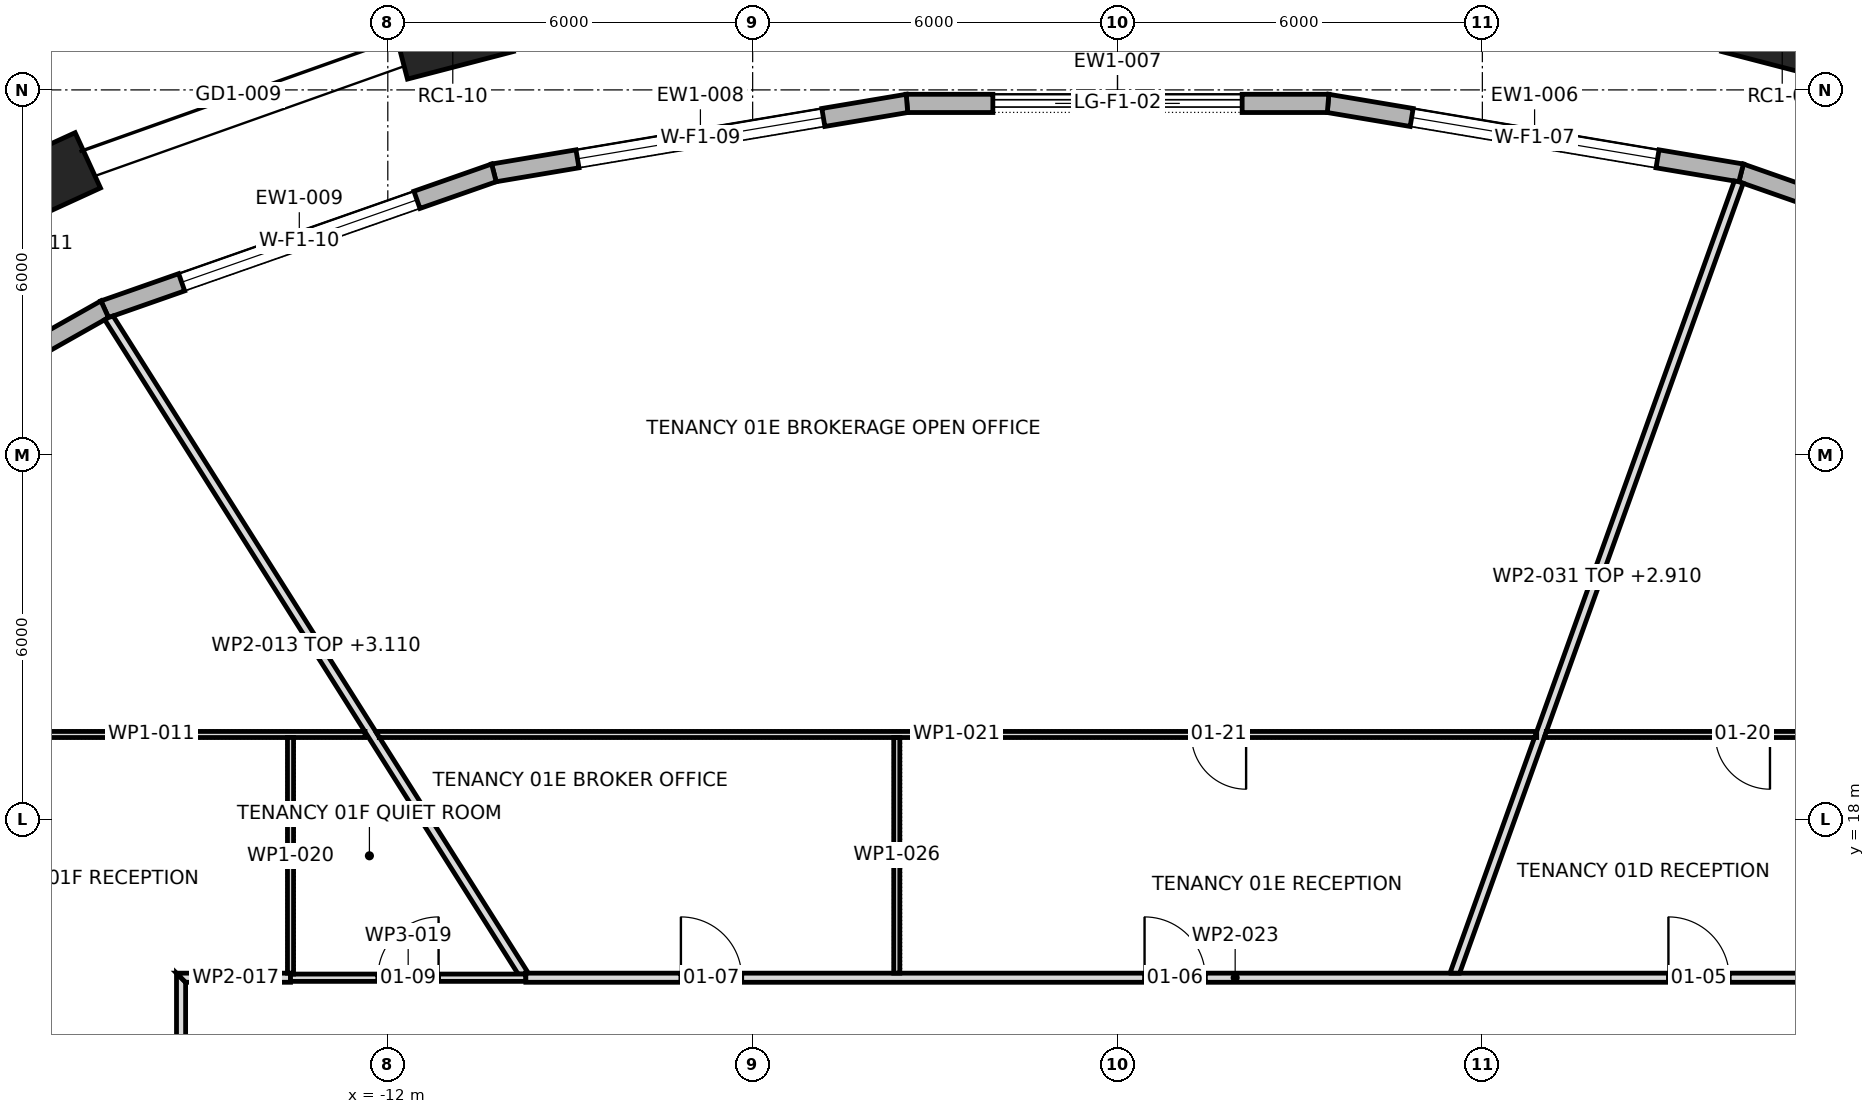
"""IFC4 building model, lengths in metres.
Left out: names, types, materials, properties, quantities, classifications, styles, units other than length and angle.
Written with IfcOpenShell. Run it as: python <this file> out.ifc"""

import sys

from ifc_helpers import new_model, si_unit, direction, frame, frame_2d, origin, origin_2d, place, context, subcontext, project, spatial, polyline, rectangle, outline, extrude, element, fill, save


model = new_model("IFC4")
c1 = context("Model", 3, precision=1e-05, world=origin(), true_north=direction((0.0, 1.0)))
c2 = subcontext(c1, "Body", "Model", "MODEL_VIEW")
j1 = project(units=[si_unit("LENGTHUNIT", "METRE"), si_unit("PLANEANGLEUNIT", "RADIAN")], contexts=[c1])
p1 = place(None, origin())
s1 = spatial("IfcSite", under=j1, at=p1, CompositionType="ELEMENT")
p2 = place(p1, origin())
s2 = spatial("IfcBuilding", under=s1, at=p2, CompositionType="ELEMENT")
p3 = place(p2, frame((0.0, 0.0, 31.9)))
s3 = spatial("IfcBuildingStorey", under=s2, at=p3, CompositionType="ELEMENT", Elevation=31.9)
for number, where, z_axis, x_axis in (
    (1, (10.931, 30.888, 0.0), (0.0, 0.0, 1.0), (-0.968, 0.252, 0.0)),
    (2, (-10.931, 30.888, 0.0), (0.0, 0.0, 1.0), (-0.968, -0.252, 0.0)),
    (3, (-17.752, 28.467, 0.0), (0.0, 0.0, 1.0), (-0.909, -0.417, 0.0)),
):
    element("IfcColumn", number, at=place(p3, frame(where, z_axis=z_axis, x_axis=x_axis)), inside=s3, PredefinedType="COLUMN", context=c2, shape_type="SweptSolid", body=[
        extrude(rectangle(XDim=1.8, YDim=1.0, at=origin_2d()), origin(), (0.0, 0.0, 1.0), 4.2),
    ])
p4 = place(p3, frame((16.656, 26.393, 0.0), z_axis=(0.0, 0.0, 1.0), x_axis=(-0.943767392455, 0.330610206947, 0.0)))
e4 = element("IfcWall", 4, at=p4, inside=s3, PredefinedType="STANDARD", context=c2, shape_type="SweptSolid", body=[
    extrude(outline(polyline([(-0.013, -0.15), (6.794, -0.15), (6.769, 0.15), (0.013, 0.15), (-0.013, -0.15)])), origin(), (0.0, 0.0, 1.0), 3.9),
])
p5 = place(p4, frame((1.341, 0.0, 0.6)))
e5 = element("IfcOpeningElement", 5, at=p5, cuts=e4, PredefinedType="OPENING", context=c2, shape_type="SweptSolid", body=[
    extrude(rectangle(XDim=4.1, YDim=2.85, at=frame_2d((2.05, 1.425))), frame((0.0, 0.162, 0.0), z_axis=(0.0, -1.0, 0.0), x_axis=(1.0, 0.0, 0.0)), (0.0, 0.0, 1.0), 0.324),
])
p6 = place(p3, frame((10.256, 28.635, 0.0), z_axis=(0.0, 0.0, 1.0), x_axis=(-0.986141805867, 0.165904607291, 0.0)))
e6 = element("IfcWall", 6, at=p6, inside=s3, PredefinedType="STANDARD", context=c2, shape_type="SweptSolid", body=[
    extrude(outline(polyline([(-0.013, -0.15), (6.901, -0.15), (6.876, 0.15), (0.013, 0.15), (-0.013, -0.15)])), origin(), (0.0, 0.0, 1.0), 3.9),
])
p7 = place(p6, frame((1.394, 0.0, 0.6)))
e7 = element("IfcOpeningElement", 7, at=p7, cuts=e6, PredefinedType="OPENING", context=c2, shape_type="SweptSolid", body=[
    extrude(rectangle(XDim=4.1, YDim=2.85, at=frame_2d((2.05, 1.425))), frame((0.0, 0.162, 0.0), z_axis=(0.0, -1.0, 0.0), x_axis=(1.0, 0.0, 0.0)), (0.0, 0.0, 1.0), 0.324),
])
p8 = place(p3, frame((3.463, 29.778, 0.0), z_axis=(0.0, 0.0, 1.0), x_axis=(-1.0, 0.0, 0.0)))
e8 = element("IfcWall", 8, at=p8, inside=s3, PredefinedType="STANDARD", context=c2, shape_type="SweptSolid", body=[
    extrude(outline(polyline([(-0.012, -0.15), (6.938, -0.15), (6.913, 0.15), (0.012, 0.15), (-0.012, -0.15)])), origin(), (0.0, 0.0, 1.0), 3.9),
])
p9 = place(p8, frame((1.413, 0.0, 0.0)))
e9 = element("IfcOpeningElement", 9, at=p9, cuts=e8, PredefinedType="OPENING", context=c2, shape_type="SweptSolid", body=[
    extrude(rectangle(XDim=4.1, YDim=3.45, at=frame_2d((2.05, 1.725))), frame((0.0, 0.162, 0.0), z_axis=(0.0, -1.0, 0.0), x_axis=(1.0, 0.0, 0.0)), (0.0, 0.0, 1.0), 0.324),
])
p10 = place(p3, frame((-3.463, 29.778, 0.0), z_axis=(0.0, 0.0, 1.0), x_axis=(-0.986141805867, -0.165904607291, 0.0)))
e10 = element("IfcWall", 10, at=p10, inside=s3, PredefinedType="STANDARD", context=c2, shape_type="SweptSolid", body=[
    extrude(outline(polyline([(-0.012, -0.15), (6.901, -0.15), (6.876, 0.15), (0.012, 0.15), (-0.012, -0.15)])), origin(), (0.0, 0.0, 1.0), 3.9),
])
p11 = place(p10, frame((1.394, 0.0, 0.6)))
e11 = element("IfcOpeningElement", 11, at=p11, cuts=e10, PredefinedType="OPENING", context=c2, shape_type="SweptSolid", body=[
    extrude(rectangle(XDim=4.1, YDim=2.85, at=frame_2d((2.05, 1.425))), frame((0.0, 0.162, 0.0), z_axis=(0.0, -1.0, 0.0), x_axis=(1.0, 0.0, 0.0)), (0.0, 0.0, 1.0), 0.324),
])
p12 = place(p3, frame((-10.256, 28.635, 0.0), z_axis=(0.0, 0.0, 1.0), x_axis=(-0.943767392455, -0.330610206947, 0.0)))
e12 = element("IfcWall", 12, at=p12, inside=s3, PredefinedType="STANDARD", context=c2, shape_type="SweptSolid", body=[
    extrude(outline(polyline([(-0.013, -0.15), (6.795, -0.15), (6.768, 0.15), (0.013, 0.15), (-0.013, -0.15)])), origin(), (0.0, 0.0, 1.0), 3.9),
])
p13 = place(p12, frame((1.341, 0.0, 0.6)))
e13 = element("IfcOpeningElement", 13, at=p13, cuts=e12, PredefinedType="OPENING", context=c2, shape_type="SweptSolid", body=[
    extrude(rectangle(XDim=4.1, YDim=2.85, at=frame_2d((2.05, 1.425))), frame((0.0, 0.162, 0.0), z_axis=(0.0, -1.0, 0.0), x_axis=(1.0, 0.0, 0.0)), (0.0, 0.0, 1.0), 0.324),
])
p14 = place(p3, frame((-16.656, 26.393, 0.0), z_axis=(0.0, 0.0, 1.0), x_axis=(-0.8705786416, -0.492029296678, 0.0)))
e14 = element("IfcWall", 14, at=p14, inside=s3, PredefinedType="STANDARD", context=c2, shape_type="SweptSolid", body=[
    extrude(outline(polyline([(-0.013, -0.15), (6.632, -0.15), (6.604, 0.15), (0.013, 0.15), (-0.013, -0.15)])), origin(), (0.0, 0.0, 1.0), 3.9),
])
p15 = place(p14, frame((1.259, 0.0, 0.6)))
e15 = element("IfcOpeningElement", 15, at=p15, cuts=e14, PredefinedType="OPENING", context=c2, shape_type="SweptSolid", body=[
    extrude(rectangle(XDim=4.1, YDim=2.85, at=frame_2d((2.05, 1.425))), frame((0.0, 0.162, 0.0), z_axis=(0.0, -1.0, 0.0), x_axis=(1.0, 0.0, 0.0)), (0.0, 0.0, 1.0), 0.324),
])
p16 = place(p3, frame((-19.45, 19.4, 0.0), z_axis=(0.0, 0.0, 1.0), x_axis=(1.0, 0.0, 0.0)))
e16 = element("IfcWall", 16, at=p16, inside=s3, PredefinedType="PARTITIONING", context=c2, shape_type="SweptSolid", body=[
    extrude(outline(polyline([(7.075, 0.05), (5.306, 0.05), (3.538, 0.05), (1.769, 0.05), (0.0, 0.05), (0.1, -0.05), (1.844, -0.05), (3.587, -0.05), (5.331, -0.05), (7.075, -0.05), (7.075, 0.05)])), origin(), (0.0, 0.0, 1.0), 3.9),
])
p17 = place(p3, frame((-16.592, 26.26, 0.0), z_axis=(0.0, 0.0, 1.0), x_axis=(0.534158681269, -0.845384234077, 0.0)))
e17 = element("IfcWall", 17, at=p17, inside=s3, PredefinedType="PARTITIONING", context=c2, shape_type="SweptSolid", body=[
    extrude(outline(polyline([(0.0, -0.075), (1.602, -0.075), (3.204, -0.075), (4.805, -0.075), (6.407, -0.075), (8.009, -0.075), (8.01, -0.073), (8.014, -0.075), (9.585, -0.075), (11.157, -0.075), (12.729, -0.075), (12.782, 0.01), (12.782, 0.01), (12.796, 0.032), (12.783, 0.04), (12.805, 0.075), (12.805, 0.075), (11.278, 0.075), (9.75, 0.075), (8.222, 0.075), (8.22, 0.073), (8.217, 0.075), (6.577, 0.075), (4.938, 0.075), (3.299, 0.075), (1.66, 0.075), (0.021, 0.075), (0.003, -0.003), (0.0, -0.07), (0.0, -0.075)])), origin(), (0.0, 0.0, 1.0), 3.11),
])
p18 = place(p3, frame((-15.4, -9.09, 0.0), z_axis=(0.0, 0.0, 1.0), x_axis=(0.0, 1.0, 0.0)))
e18 = element("IfcWall", 18, at=p18, inside=s3, PredefinedType="PARTITIONING", context=c2, shape_type="SweptSolid", body=[
    extrude(outline(polyline([(0.0, -0.075), (1.878, -0.075), (3.756, -0.075), (5.634, -0.075), (7.512, -0.075), (9.39, -0.075), (11.269, -0.075), (13.146, -0.075), (15.025, -0.075), (16.903, -0.075), (18.781, -0.075), (20.659, -0.075), (22.537, -0.075), (24.415, -0.075), (24.565, 0.075), (22.675, 0.075), (20.786, 0.075), (18.896, 0.075), (17.007, 0.075), (15.117, 0.075), (13.227, 0.075), (11.338, 0.075), (9.448, 0.075), (7.558, 0.075), (5.669, 0.075), (3.779, 0.075), (1.89, 0.075), (0.0, 0.075), (0.0, -0.075)])), origin(), (0.0, 0.0, 1.0), 3.9),
])
p19 = place(p18, frame((19.77, 0.0, 0.0)))
e19 = element("IfcOpeningElement", 19, at=p19, cuts=e18, PredefinedType="OPENING", context=c2, shape_type="SweptSolid", body=[
    extrude(rectangle(XDim=1.0, YDim=2.1, at=frame_2d((0.5, 1.05))), frame((0.0, 0.087, 0.0), z_axis=(0.0, -1.0, 0.0), x_axis=(1.0, 0.0, 0.0)), (0.0, 0.0, 1.0), 0.174),
])
p20 = place(p18, frame((11.43, 0.0, 0.0)))
e20 = element("IfcOpeningElement", 20, at=p20, cuts=e18, PredefinedType="OPENING", context=c2, shape_type="SweptSolid", body=[
    extrude(rectangle(XDim=1.0, YDim=2.1, at=frame_2d((0.5, 1.05))), frame((0.0, 0.087, 0.0), z_axis=(0.0, -1.0, 0.0), x_axis=(1.0, 0.0, 0.0)), (0.0, 0.0, 1.0), 0.174),
])
p21 = place(p18, frame((3.405, 0.0, 0.0)))
e21 = element("IfcOpeningElement", 21, at=p21, cuts=e18, PredefinedType="OPENING", context=c2, shape_type="SweptSolid", body=[
    extrude(rectangle(XDim=1.0, YDim=2.1, at=frame_2d((0.5, 1.05))), frame((0.0, 0.087, 0.0), z_axis=(0.0, -1.0, 0.0), x_axis=(1.0, 0.0, 0.0)), (0.0, 0.0, 1.0), 0.174),
])
p22 = place(p3, frame((-15.475, 15.4, 0.0), z_axis=(0.0, 0.0, 1.0), x_axis=(1.0, 0.0, 0.0)))
e22 = element("IfcWall", 22, at=p22, inside=s3, PredefinedType="PARTITIONING", context=c2, shape_type="SweptSolid", body=[
    extrude(outline(polyline([(1.875, 0.075), (0.0, 0.075), (0.15, -0.075), (1.875, -0.075), (1.875, 0.075)])), origin(), (0.0, 0.0, 1.0), 3.9),
])
p23 = place(p3, frame((-13.6, 15.4, 0.0), z_axis=(0.0, 0.0, 1.0), x_axis=(1.0, 0.0, 0.0)))
e23 = element("IfcWall", 23, at=p23, inside=s3, PredefinedType="PARTITIONING", context=c2, shape_type="SweptSolid", body=[
    extrude(rectangle(XDim=3.87, YDim=0.12, at=frame_2d((1.935, 0.0))), origin(), (0.0, 0.0, 1.0), 3.9),
])
p24 = place(p23, frame((1.435, 0.0, 0.0)))
e24 = element("IfcOpeningElement", 24, at=p24, cuts=e23, PredefinedType="OPENING", context=c2, shape_type="SweptSolid", body=[
    extrude(rectangle(XDim=1.0, YDim=2.1, at=frame_2d((0.5, 1.05))), frame((0.0, 0.072, 0.0), z_axis=(0.0, -1.0, 0.0), x_axis=(1.0, 0.0, 0.0)), (0.0, 0.0, 1.0), 0.144),
])
p25 = place(p3, frame((-13.6, 19.35, 0.0), z_axis=(0.0, 0.0, 1.0), x_axis=(0.0, -1.0, 0.0)))
e25 = element("IfcWall", 25, at=p25, inside=s3, PredefinedType="PARTITIONING", context=c2, shape_type="SweptSolid", body=[
    extrude(outline(polyline([(0.0, -0.05), (1.938, -0.05), (3.875, -0.05), (3.875, 0.0), (3.89, 0.0), (3.89, 0.05), (1.945, 0.05), (0.0, 0.05), (0.0, -0.05)])), origin(), (0.0, 0.0, 1.0), 3.9),
])
p26 = place(p3, frame((-12.2, 19.4, 0.0), z_axis=(0.0, 0.0, 1.0), x_axis=(1.0, 0.0, 0.0)))
e26 = element("IfcWall", 26, at=p26, inside=s3, PredefinedType="PARTITIONING", context=c2, shape_type="SweptSolid", body=[
    extrude(outline(polyline([(0.063, -0.05), (1.754, -0.05), (3.446, -0.05), (5.137, -0.05), (6.829, -0.05), (8.52, -0.05), (8.52, -0.05), (8.62, -0.05), (8.62, -0.05), (10.36, -0.05), (12.099, -0.05), (13.839, -0.05), (15.579, -0.05), (17.319, -0.05), (19.058, -0.05), (19.094, 0.049), (19.094, 0.05), (17.185, 0.05), (15.275, 0.05), (13.366, 0.05), (11.456, 0.05), (9.547, 0.05), (7.638, 0.05), (5.728, 0.05), (3.819, 0.05), (1.909, 0.05), (0.0, 0.05), (0.0, 0.05), (0.063, -0.05)])), origin(), (0.0, 0.0, 1.0), 3.9),
])
p27 = place(p26, frame((13.415, 0.0, 0.0)))
e27 = element("IfcOpeningElement", 27, at=p27, cuts=e26, PredefinedType="OPENING", context=c2, shape_type="SweptSolid", body=[
    extrude(rectangle(XDim=0.9, YDim=2.1, at=frame_2d((0.45, 1.05))), frame((0.0, 0.062, 0.0), z_axis=(0.0, -1.0, 0.0), x_axis=(1.0, 0.0, 0.0)), (0.0, 0.0, 1.0), 0.124),
])
p28 = place(p3, frame((-9.73, 15.4, 0.0), z_axis=(0.0, 0.0, 1.0), x_axis=(1.0, 0.0, 0.0)))
e28 = element("IfcWall", 28, at=p28, inside=s3, PredefinedType="PARTITIONING", context=c2, shape_type="SweptSolid", body=[
    extrude(rectangle(XDim=23.33, YDim=0.15, at=frame_2d((11.665, 0.0))), origin(), (0.0, 0.0, 1.0), 3.9),
])
p29 = place(p28, frame((18.79, 0.0, 0.0)))
e29 = element("IfcOpeningElement", 29, at=p29, cuts=e28, PredefinedType="OPENING", context=c2, shape_type="SweptSolid", body=[
    extrude(rectangle(XDim=1.0, YDim=2.1, at=frame_2d((0.5, 1.05))), frame((0.0, 0.087, 0.0), z_axis=(0.0, -1.0, 0.0), x_axis=(1.0, 0.0, 0.0)), (0.0, 0.0, 1.0), 0.174),
])
p30 = place(p28, frame((10.175, 0.0, 0.0)))
e30 = element("IfcOpeningElement", 30, at=p30, cuts=e28, PredefinedType="OPENING", context=c2, shape_type="SweptSolid", body=[
    extrude(rectangle(XDim=1.0, YDim=2.1, at=frame_2d((0.5, 1.05))), frame((0.0, 0.087, 0.0), z_axis=(0.0, -1.0, 0.0), x_axis=(1.0, 0.0, 0.0)), (0.0, 0.0, 1.0), 0.174),
])
p31 = place(p28, frame((2.55, 0.0, 0.0)))
e31 = element("IfcOpeningElement", 31, at=p31, cuts=e28, PredefinedType="OPENING", context=c2, shape_type="SweptSolid", body=[
    extrude(rectangle(XDim=1.0, YDim=2.1, at=frame_2d((0.5, 1.05))), frame((0.0, 0.087, 0.0), z_axis=(0.0, -1.0, 0.0), x_axis=(1.0, 0.0, 0.0)), (0.0, 0.0, 1.0), 0.174),
])
p32 = place(p3, frame((-3.63, 15.475, 0.0), z_axis=(0.0, 0.0, 1.0), x_axis=(0.0, 1.0, 0.0)))
e32 = element("IfcWall", 32, at=p32, inside=s3, PredefinedType="PARTITIONING", context=c2, shape_type="SweptSolid", body=[
    extrude(rectangle(XDim=3.875, YDim=0.1, at=frame_2d((1.938, 0.0))), origin(), (0.0, 0.0, 1.0), 3.9),
])
p33 = place(p3, frame((5.538, 15.45, 0.0), z_axis=(0.0, 0.0, 1.0), x_axis=(0.337914385466, 0.94117685272, 0.0)))
e33 = element("IfcWall", 33, at=p33, inside=s3, PredefinedType="PARTITIONING", context=c2, shape_type="SweptSolid", body=[
    extrude(outline(polyline([(0.053, -0.075), (1.46, -0.075), (2.867, -0.075), (4.274, -0.075), (4.277, -0.074), (4.277, -0.075), (6.192, -0.075), (8.108, -0.075), (10.023, -0.075), (11.939, -0.075), (13.854, -0.075), (13.854, -0.063), (13.854, 0.001), (13.841, 0.075), (11.917, 0.075), (9.993, 0.075), (8.07, 0.075), (6.146, 0.075), (4.222, 0.075), (4.129, 0.042), (4.117, 0.075), (2.745, 0.075), (1.372, 0.075), (0.0, 0.075), (0.0, 0.074), (0.053, -0.075)])), origin(), (0.0, 0.0, 1.0), 2.91),
])
p34 = place(p3, frame((7.018, 19.4, 0.0), z_axis=(0.0, 0.0, 1.0), x_axis=(1.0, 0.0, 0.0)))
e34 = element("IfcWall", 34, at=p34, inside=s3, PredefinedType="PARTITIONING", context=c2, shape_type="SweptSolid", body=[
    extrude(outline(polyline([(0.0, -0.05), (1.633, -0.05), (3.266, -0.05), (4.899, -0.05), (6.532, -0.05), (6.532, -0.05), (6.632, -0.05), (6.632, -0.05), (8.532, -0.05), (10.432, -0.05), (12.332, -0.05), (12.332, -0.05), (12.432, 0.05), (10.661, 0.05), (8.89, 0.05), (7.119, 0.05), (5.348, 0.05), (3.577, 0.05), (1.807, 0.05), (0.036, 0.05), (0.0, -0.049), (0.0, -0.05)])), origin(), (0.0, 0.0, 1.0), 3.9),
])
p35 = place(p34, frame((2.812, 0.0, 0.0)))
e35 = element("IfcOpeningElement", 35, at=p35, cuts=e34, PredefinedType="OPENING", context=c2, shape_type="SweptSolid", body=[
    extrude(rectangle(XDim=0.9, YDim=2.1, at=frame_2d((0.45, 1.05))), frame((0.0, 0.062, 0.0), z_axis=(0.0, -1.0, 0.0), x_axis=(1.0, 0.0, 0.0)), (0.0, 0.0, 1.0), 0.124),
])
p36 = place(p7, origin())
e36 = element("IfcWindow", 36, at=p36, inside=s3, PartitioningType="TRIPLE_PANEL_VERTICAL", PredefinedType="WINDOW", context=c2, shape_type="SweptSolid", body=[
    extrude(rectangle(XDim=4.1, YDim=2.85, at=frame_2d((2.05, 1.425))), frame((0.0, 0.03, 0.0), z_axis=(0.0, -1.0, 0.0), x_axis=(1.0, 0.0, 0.0)), (0.0, 0.0, 1.0), 0.06),
])
fill(e7, e36)
p37 = place(p9, origin())
e37 = element("IfcDoor", 37, at=p37, inside=s3, OperationType="DOUBLE_DOOR_SLIDING", PredefinedType="DOOR", context=c2, shape_type="SweptSolid", body=[
    extrude(rectangle(XDim=4.1, YDim=3.45, at=frame_2d((2.05, 1.725))), frame((0.0, 0.025, 0.0), z_axis=(0.0, -1.0, 0.0), x_axis=(1.0, 0.0, 0.0)), (0.0, 0.0, 1.0), 0.05),
])
fill(e9, e37)
p38 = place(p11, origin())
e38 = element("IfcWindow", 38, at=p38, inside=s3, PartitioningType="TRIPLE_PANEL_VERTICAL", PredefinedType="WINDOW", context=c2, shape_type="SweptSolid", body=[
    extrude(rectangle(XDim=4.1, YDim=2.85, at=frame_2d((2.05, 1.425))), frame((0.0, 0.03, 0.0), z_axis=(0.0, -1.0, 0.0), x_axis=(1.0, 0.0, 0.0)), (0.0, 0.0, 1.0), 0.06),
])
fill(e11, e38)
p39 = place(p13, origin())
e39 = element("IfcWindow", 39, at=p39, inside=s3, PartitioningType="TRIPLE_PANEL_VERTICAL", PredefinedType="WINDOW", context=c2, shape_type="SweptSolid", body=[
    extrude(rectangle(XDim=4.1, YDim=2.85, at=frame_2d((2.05, 1.425))), frame((0.0, 0.03, 0.0), z_axis=(0.0, -1.0, 0.0), x_axis=(1.0, 0.0, 0.0)), (0.0, 0.0, 1.0), 0.06),
])
fill(e13, e39)
p40 = place(p29, origin())
e40 = element("IfcDoor", 40, at=p40, inside=s3, OperationType="SINGLE_SWING_RIGHT", PredefinedType="DOOR", context=c2, shape_type="SweptSolid", body=[
    extrude(rectangle(XDim=1.0, YDim=2.1, at=frame_2d((0.5, 1.05))), frame((0.0, 0.025, 0.0), z_axis=(0.0, -1.0, 0.0), x_axis=(1.0, 0.0, 0.0)), (0.0, 0.0, 1.0), 0.05),
])
fill(e29, e40)
p41 = place(p30, origin())
e41 = element("IfcDoor", 41, at=p41, inside=s3, OperationType="SINGLE_SWING_RIGHT", PredefinedType="DOOR", context=c2, shape_type="SweptSolid", body=[
    extrude(rectangle(XDim=1.0, YDim=2.1, at=frame_2d((0.5, 1.05))), frame((0.0, 0.025, 0.0), z_axis=(0.0, -1.0, 0.0), x_axis=(1.0, 0.0, 0.0)), (0.0, 0.0, 1.0), 0.05),
])
fill(e30, e41)
p42 = place(p31, origin())
e42 = element("IfcDoor", 42, at=p42, inside=s3, OperationType="SINGLE_SWING_RIGHT", PredefinedType="DOOR", context=c2, shape_type="SweptSolid", body=[
    extrude(rectangle(XDim=1.0, YDim=2.1, at=frame_2d((0.5, 1.05))), frame((0.0, 0.025, 0.0), z_axis=(0.0, -1.0, 0.0), x_axis=(1.0, 0.0, 0.0)), (0.0, 0.0, 1.0), 0.05),
])
fill(e31, e42)
p43 = place(p24, origin())
e43 = element("IfcDoor", 43, at=p43, inside=s3, OperationType="SINGLE_SWING_LEFT", PredefinedType="DOOR", context=c2, shape_type="SweptSolid", body=[
    extrude(rectangle(XDim=1.0, YDim=2.1, at=frame_2d((0.5, 1.05))), frame((0.0, 0.025, 0.0), z_axis=(0.0, -1.0, 0.0), x_axis=(1.0, 0.0, 0.0)), (0.0, 0.0, 1.0), 0.05),
])
fill(e24, e43)
p44 = place(p35, frame((0.9, 0.0, 0.0), z_axis=(0.0, 0.0, 1.0), x_axis=(-1.0, 0.0, 0.0)))
e44 = element("IfcDoor", 44, at=p44, inside=s3, OperationType="SINGLE_SWING_RIGHT", PredefinedType="DOOR", context=c2, shape_type="SweptSolid", body=[
    extrude(rectangle(XDim=0.9, YDim=2.1, at=frame_2d((0.45, 1.05))), frame((0.0, 0.025, 0.0), z_axis=(0.0, -1.0, 0.0), x_axis=(1.0, 0.0, 0.0)), (0.0, 0.0, 1.0), 0.05),
])
fill(e35, e44)
p45 = place(p27, frame((0.9, 0.0, 0.0), z_axis=(0.0, 0.0, 1.0), x_axis=(-1.0, 0.0, 0.0)))
e45 = element("IfcDoor", 45, at=p45, inside=s3, OperationType="SINGLE_SWING_RIGHT", PredefinedType="DOOR", context=c2, shape_type="SweptSolid", body=[
    extrude(rectangle(XDim=0.9, YDim=2.1, at=frame_2d((0.45, 1.05))), frame((0.0, 0.025, 0.0), z_axis=(0.0, -1.0, 0.0), x_axis=(1.0, 0.0, 0.0)), (0.0, 0.0, 1.0), 0.05),
])
fill(e27, e45)
save(model, sys.argv[1])
